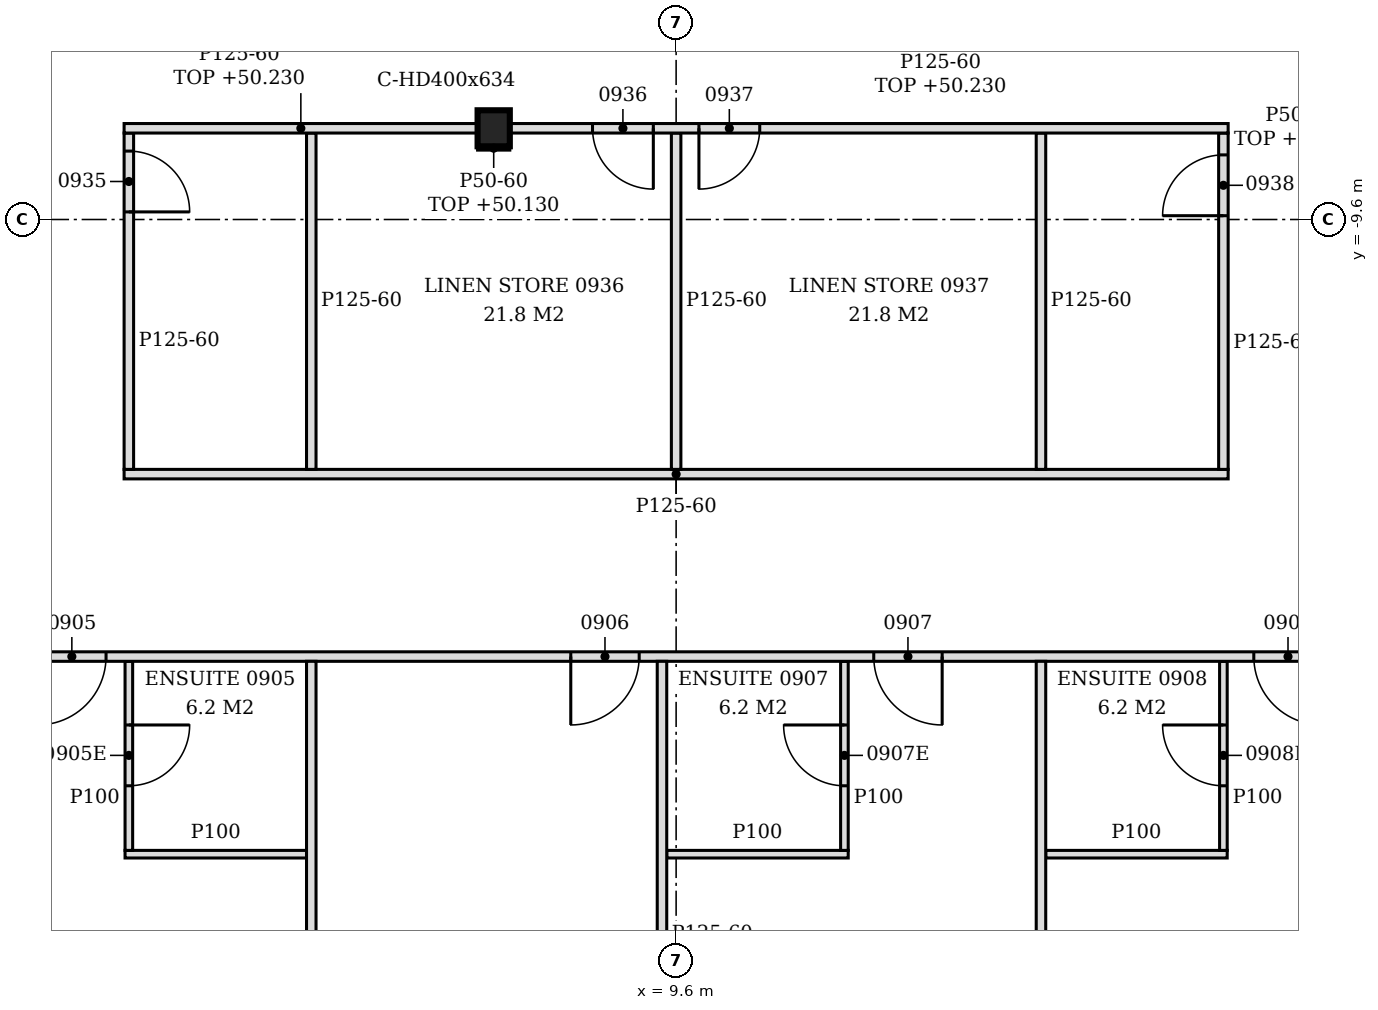
"""IFC4 building model, lengths in metres.
Left out: names, types, materials, properties, quantities, classifications, styles, units other than length and angle.
Written with IfcOpenShell. Run it as: python <this file> out.ifc"""

import sys

from ifc_helpers import new_model, si_unit, direction, frame, frame_2d, origin, origin_2d, place, context, subcontext, project, spatial, polyline, rectangle, i_section, outline, extrude, element, fill, save


model = new_model("IFC4")
c1 = context("Model", 3, precision=1e-05, world=origin(), true_north=direction((0.0, 1.0)))
c2 = subcontext(c1, "Body", "Model", "MODEL_VIEW")
j1 = project(units=[si_unit("LENGTHUNIT", "METRE"), si_unit("PLANEANGLEUNIT", "RADIAN")], contexts=[c1])
p1 = place(None, origin())
s1 = spatial("IfcSite", under=j1, at=p1, CompositionType="ELEMENT")
p2 = place(p1, origin())
s2 = spatial("IfcBuilding", under=s1, at=p2, CompositionType="ELEMENT")
p3 = place(p2, frame((0.0, 0.0, 47.4)))
s3 = spatial("IfcBuildingStorey", under=s2, at=p3, CompositionType="ELEMENT", Elevation=47.4)
p4 = place(p3, frame((7.2, -8.4, -0.15), z_axis=(0.0, 0.0, 1.0), x_axis=(1.0, 0.0, 0.0)))
e1 = element("IfcColumn", 1, at=p4, inside=s3, PredefinedType="COLUMN", context=c2, shape_type="SweptSolid", body=[
    extrude(i_section(OverallWidth=0.424, OverallDepth=0.474, WebThickness=0.048, FlangeThickness=0.077, FilletRadius=0.015, at=origin_2d()), origin(), (0.0, 0.0, 1.0), 3.6),
])
for number, where, z_axis, x_axis in (
    (2, (4.8, -23.65, 0.0), (0.0, 0.0, 1.0), (0.0, 1.0, 0.0)),
    (3, (14.4, -23.65, 0.0), (0.0, 0.0, 1.0), (0.0, 1.0, 0.0)),
):
    element("IfcWall", number, at=place(p3, frame(where, z_axis=z_axis, x_axis=x_axis)), inside=s3, PredefinedType="PARTITIONING", context=c2, shape_type="SweptSolid", body=[
        extrude(outline(polyline([(0.0, 0.0), (8.237, 0.0), (8.238, 3.45), (4.555, 3.45), (4.553, 2.88), (4.345, 2.88), (4.343, 3.45), (0.7, 3.45), (0.698, 2.93), (0.4, 2.93), (0.398, 3.45), (0.0, 3.45), (0.0, 0.0)])), frame((0.0, 0.062, 0.0), z_axis=(0.0, -1.0, 0.0), x_axis=(1.0, 0.0, 0.0)), (0.0, 0.0, 1.0), 0.125),
    ])
p5 = place(p3, frame((9.414, -22.6, 0.0), z_axis=(0.0, 0.0, 1.0), x_axis=(0.0, 1.0, 0.0)))
e4 = element("IfcWall", 4, at=p5, inside=s3, PredefinedType="PARTITIONING", context=c2, shape_type="SweptSolid", body=[
    extrude(outline(polyline([(0.0, 0.0), (7.188, 0.0), (7.188, 3.45), (3.505, 3.45), (3.503, 2.88), (3.295, 2.88), (3.293, 3.45), (0.0, 3.45), (0.0, 0.0)])), frame((0.0, 0.062, 0.0), z_axis=(0.0, -1.0, 0.0), x_axis=(1.0, 0.0, 0.0)), (0.0, 0.0, 1.0), 0.125),
])
p6 = place(p3, frame((2.35, -17.95, 0.0), z_axis=(0.0, 0.0, 1.0), x_axis=(1.0, 0.0, 0.0)))
e5 = element("IfcWall", 5, at=p6, inside=s3, PredefinedType="PARTITIONING", context=c2, shape_type="SweptSolid", body=[
    extrude(rectangle(XDim=2.387, YDim=0.1, at=frame_2d((1.194, 0.0))), origin(), (0.0, 0.0, 1.0), 3.45),
])
p7 = place(p3, frame((2.4, -17.9, 0.0), z_axis=(0.0, 0.0, 1.0), x_axis=(0.0, 1.0, 0.0)))
e6 = element("IfcWall", 6, at=p7, inside=s3, PredefinedType="PARTITIONING", context=c2, shape_type="SweptSolid", body=[
    extrude(rectangle(XDim=2.487, YDim=0.1, at=frame_2d((1.244, 0.0))), origin(), (0.0, 0.0, 1.0), 3.45),
])
p8 = place(p7, frame((0.85, 0.0, 0.0)))
e7 = element("IfcOpeningElement", 7, at=p8, cuts=e6, PredefinedType="OPENING", context=c2, shape_type="SweptSolid", body=[
    extrude(rectangle(XDim=0.8, YDim=2.1, at=frame_2d((0.4, 1.05))), frame((0.0, 0.06, 0.0), z_axis=(0.0, -1.0, 0.0), x_axis=(1.0, 0.0, 0.0)), (0.0, 0.0, 1.0), 0.12),
])
p9 = place(p3, frame((9.477, -17.95, 0.0), z_axis=(0.0, 0.0, 1.0), x_axis=(1.0, 0.0, 0.0)))
e8 = element("IfcWall", 8, at=p9, inside=s3, PredefinedType="PARTITIONING", context=c2, shape_type="SweptSolid", body=[
    extrude(rectangle(XDim=2.387, YDim=0.1, at=frame_2d((1.194, 0.0))), origin(), (0.0, 0.0, 1.0), 3.45),
])
p10 = place(p3, frame((11.814, -17.9, 0.0), z_axis=(0.0, 0.0, 1.0), x_axis=(0.0, 1.0, 0.0)))
e9 = element("IfcWall", 9, at=p10, inside=s3, PredefinedType="PARTITIONING", context=c2, shape_type="SweptSolid", body=[
    extrude(rectangle(XDim=2.487, YDim=0.1, at=frame_2d((1.244, 0.0))), origin(), (0.0, 0.0, 1.0), 3.45),
])
p11 = place(p10, frame((0.85, 0.0, 0.0)))
e10 = element("IfcOpeningElement", 10, at=p11, cuts=e9, PredefinedType="OPENING", context=c2, shape_type="SweptSolid", body=[
    extrude(rectangle(XDim=0.8, YDim=2.1, at=frame_2d((0.4, 1.05))), frame((0.0, 0.06, 0.0), z_axis=(0.0, -1.0, 0.0), x_axis=(1.0, 0.0, 0.0)), (0.0, 0.0, 1.0), 0.12),
])
p12 = place(p3, frame((14.462, -17.95, 0.0), z_axis=(0.0, 0.0, 1.0), x_axis=(1.0, 0.0, 0.0)))
e11 = element("IfcWall", 11, at=p12, inside=s3, PredefinedType="PARTITIONING", context=c2, shape_type="SweptSolid", body=[
    extrude(rectangle(XDim=2.388, YDim=0.1, at=frame_2d((1.194, 0.0))), origin(), (0.0, 0.0, 1.0), 3.45),
])
p13 = place(p3, frame((16.8, -17.9, 0.0), z_axis=(0.0, 0.0, 1.0), x_axis=(0.0, 1.0, 0.0)))
e12 = element("IfcWall", 12, at=p13, inside=s3, PredefinedType="PARTITIONING", context=c2, shape_type="SweptSolid", body=[
    extrude(rectangle(XDim=2.487, YDim=0.1, at=frame_2d((1.244, 0.0))), origin(), (0.0, 0.0, 1.0), 3.45),
])
p14 = place(p13, frame((0.85, 0.0, 0.0)))
e13 = element("IfcOpeningElement", 13, at=p14, cuts=e12, PredefinedType="OPENING", context=c2, shape_type="SweptSolid", body=[
    extrude(rectangle(XDim=0.8, YDim=2.1, at=frame_2d((0.4, 1.05))), frame((0.0, 0.06, 0.0), z_axis=(0.0, -1.0, 0.0), x_axis=(1.0, 0.0, 0.0)), (0.0, 0.0, 1.0), 0.12),
])
p15 = place(p3, frame((-20.15, -15.35, 0.0), z_axis=(0.0, 0.0, 1.0), x_axis=(1.0, 0.0, 0.0)))
e14 = element("IfcWall", 14, at=p15, inside=s3, PredefinedType="PARTITIONING", context=c2, shape_type="SweptSolid", body=[
    extrude(outline(polyline([(0.0, 0.0), (39.287, 0.0), (39.288, 2.73), (39.2, 2.73), (39.198, 3.45), (27.5, 3.45), (27.498, 2.73), (27.2, 2.73), (27.198, 3.45), (15.5, 3.45), (15.498, 2.73), (15.2, 2.73), (15.198, 3.45), (5.9, 3.45), (5.898, 2.93), (5.6, 2.93), (5.598, 3.45), (0.0, 3.45), (0.0, 0.0)])), frame((0.0, 0.062, 0.0), z_axis=(0.0, -1.0, 0.0), x_axis=(1.0, 0.0, 0.0)), (0.0, 0.0, 1.0), 0.125),
])
p16 = place(p15, frame((4.55, 0.0, 0.0)))
e15 = element("IfcOpeningElement", 15, at=p16, cuts=e14, PredefinedType="OPENING", context=c2, shape_type="SweptSolid", body=[
    extrude(rectangle(XDim=0.9, YDim=2.1, at=frame_2d((0.45, 1.05))), frame((0.0, 0.073, 0.0), z_axis=(0.0, -1.0, 0.0), x_axis=(1.0, 0.0, 0.0)), (0.0, 0.0, 1.0), 0.145),
])
p17 = place(p15, frame((7.136, 0.0, 0.0)))
e16 = element("IfcOpeningElement", 16, at=p17, cuts=e14, PredefinedType="OPENING", context=c2, shape_type="SweptSolid", body=[
    extrude(rectangle(XDim=0.9, YDim=2.1, at=frame_2d((0.45, 1.05))), frame((0.0, 0.073, 0.0), z_axis=(0.0, -1.0, 0.0), x_axis=(1.0, 0.0, 0.0)), (0.0, 0.0, 1.0), 0.145),
])
p18 = place(p15, frame((14.15, 0.0, 0.0)))
e17 = element("IfcOpeningElement", 17, at=p18, cuts=e14, PredefinedType="OPENING", context=c2, shape_type="SweptSolid", body=[
    extrude(rectangle(XDim=0.9, YDim=2.1, at=frame_2d((0.45, 1.05))), frame((0.0, 0.073, 0.0), z_axis=(0.0, -1.0, 0.0), x_axis=(1.0, 0.0, 0.0)), (0.0, 0.0, 1.0), 0.145),
])
p19 = place(p15, frame((16.55, 0.0, 0.0)))
e18 = element("IfcOpeningElement", 18, at=p19, cuts=e14, PredefinedType="OPENING", context=c2, shape_type="SweptSolid", body=[
    extrude(rectangle(XDim=0.9, YDim=2.1, at=frame_2d((0.45, 1.05))), frame((0.0, 0.073, 0.0), z_axis=(0.0, -1.0, 0.0), x_axis=(1.0, 0.0, 0.0)), (0.0, 0.0, 1.0), 0.145),
])
p20 = place(p15, frame((21.35, 0.0, 0.0)))
e19 = element("IfcOpeningElement", 19, at=p20, cuts=e14, PredefinedType="OPENING", context=c2, shape_type="SweptSolid", body=[
    extrude(rectangle(XDim=0.9, YDim=2.1, at=frame_2d((0.45, 1.05))), frame((0.0, 0.073, 0.0), z_axis=(0.0, -1.0, 0.0), x_axis=(1.0, 0.0, 0.0)), (0.0, 0.0, 1.0), 0.145),
])
p21 = place(p15, frame((28.364, 0.0, 0.0)))
e20 = element("IfcOpeningElement", 20, at=p21, cuts=e14, PredefinedType="OPENING", context=c2, shape_type="SweptSolid", body=[
    extrude(rectangle(XDim=0.9, YDim=2.1, at=frame_2d((0.45, 1.05))), frame((0.0, 0.073, 0.0), z_axis=(0.0, -1.0, 0.0), x_axis=(1.0, 0.0, 0.0)), (0.0, 0.0, 1.0), 0.145),
])
p22 = place(p15, frame((32.35, 0.0, 0.0)))
e21 = element("IfcOpeningElement", 21, at=p22, cuts=e14, PredefinedType="OPENING", context=c2, shape_type="SweptSolid", body=[
    extrude(rectangle(XDim=0.9, YDim=2.1, at=frame_2d((0.45, 1.05))), frame((0.0, 0.073, 0.0), z_axis=(0.0, -1.0, 0.0), x_axis=(1.0, 0.0, 0.0)), (0.0, 0.0, 1.0), 0.145),
])
p23 = place(p15, frame((37.35, 0.0, 0.0)))
e22 = element("IfcOpeningElement", 22, at=p23, cuts=e14, PredefinedType="OPENING", context=c2, shape_type="SweptSolid", body=[
    extrude(rectangle(XDim=0.9, YDim=2.1, at=frame_2d((0.45, 1.05))), frame((0.0, 0.073, 0.0), z_axis=(0.0, -1.0, 0.0), x_axis=(1.0, 0.0, 0.0)), (0.0, 0.0, 1.0), 0.145),
])
p24 = place(p3, frame((2.337, -12.95, 0.0), z_axis=(0.0, 0.0, 1.0), x_axis=(1.0, 0.0, 0.0)))
e23 = element("IfcWall", 23, at=p24, inside=s3, PredefinedType="PARTITIONING", context=c2, shape_type="SweptSolid", body=[
    extrude(outline(polyline([(0.0, 0.0), (14.525, 0.0), (14.525, 3.45), (5.012, 3.45), (5.01, 2.73), (4.712, 2.73), (4.71, 3.45), (0.0, 3.45), (0.0, 0.0)])), frame((0.0, 0.062, 0.0), z_axis=(0.0, -1.0, 0.0), x_axis=(1.0, 0.0, 0.0)), (0.0, 0.0, 1.0), 0.125),
])
p25 = place(p3, frame((2.4, -12.887, 0.0), z_axis=(0.0, 0.0, 1.0), x_axis=(0.0, 1.0, 0.0)))
e24 = element("IfcWall", 24, at=p25, inside=s3, PredefinedType="PARTITIONING", context=c2, shape_type="SweptSolid", body=[
    extrude(outline(polyline([(0.0, 0.0), (4.425, 0.0), (4.425, 2.83), (4.337, 2.83), (4.335, 3.45), (0.0, 3.45), (0.0, 0.0)])), frame((0.0, 0.062, 0.0), z_axis=(0.0, -1.0, 0.0), x_axis=(1.0, 0.0, 0.0)), (0.0, 0.0, 1.0), 0.125),
])
p26 = place(p25, frame((3.387, 0.0, 0.0)))
e25 = element("IfcOpeningElement", 25, at=p26, cuts=e24, PredefinedType="OPENING", context=c2, shape_type="SweptSolid", body=[
    extrude(rectangle(XDim=0.8, YDim=2.1, at=frame_2d((0.4, 1.05))), frame((0.0, 0.073, 0.0), z_axis=(0.0, -1.0, 0.0), x_axis=(1.0, 0.0, 0.0)), (0.0, 0.0, 1.0), 0.145),
])
for number, where, z_axis, x_axis in (
    (26, (4.8, -12.887, 0.0), (0.0, 0.0, 1.0), (0.0, 1.0, 0.0)),
    (27, (9.6, -12.887, 0.0), (0.0, 0.0, 1.0), (0.0, 1.0, 0.0)),
    (28, (14.4, -12.887, 0.0), (0.0, 0.0, 1.0), (0.0, 1.0, 0.0)),
):
    element("IfcWall", number, at=place(p3, frame(where, z_axis=z_axis, x_axis=x_axis)), inside=s3, PredefinedType="PARTITIONING", context=c2, shape_type="SweptSolid", body=[
        extrude(outline(polyline([(0.0, 0.0), (4.425, 0.0), (4.425, 2.83), (4.337, 2.83), (4.335, 3.45), (0.0, 3.45), (0.0, 0.0)])), frame((0.0, 0.062, 0.0), z_axis=(0.0, -1.0, 0.0), x_axis=(1.0, 0.0, 0.0)), (0.0, 0.0, 1.0), 0.125),
    ])
p27 = place(p3, frame((16.8, -12.887, 0.0), z_axis=(0.0, 0.0, 1.0), x_axis=(0.0, 1.0, 0.0)))
e29 = element("IfcWall", 29, at=p27, inside=s3, PredefinedType="PARTITIONING", context=c2, shape_type="SweptSolid", body=[
    extrude(outline(polyline([(0.0, 0.0), (4.425, 0.0), (4.425, 2.83), (4.337, 2.83), (4.335, 3.45), (0.0, 3.45), (0.0, 0.0)])), frame((0.0, 0.062, 0.0), z_axis=(0.0, -1.0, 0.0), x_axis=(1.0, 0.0, 0.0)), (0.0, 0.0, 1.0), 0.125),
])
p28 = place(p27, frame((3.337, 0.0, 0.0)))
e30 = element("IfcOpeningElement", 30, at=p28, cuts=e29, PredefinedType="OPENING", context=c2, shape_type="SweptSolid", body=[
    extrude(rectangle(XDim=0.8, YDim=2.1, at=frame_2d((0.4, 1.05))), frame((0.0, 0.073, 0.0), z_axis=(0.0, -1.0, 0.0), x_axis=(1.0, 0.0, 0.0)), (0.0, 0.0, 1.0), 0.145),
])
p29 = place(p3, frame((2.337, -8.4, 0.0), z_axis=(0.0, 0.0, 1.0), x_axis=(1.0, 0.0, 0.0)))
e31 = element("IfcWall", 31, at=p29, inside=s3, PredefinedType="PARTITIONING", context=c2, shape_type="SweptSolid", body=[
    extrude(rectangle(XDim=4.651, YDim=0.125, at=frame_2d((2.325, 0.0))), origin(), (0.0, 0.0, 1.0), 2.83),
])
p30 = place(p3, frame((7.412, -8.4, 0.0), z_axis=(0.0, 0.0, 1.0), x_axis=(1.0, 0.0, 0.0)))
e32 = element("IfcWall", 32, at=p30, inside=s3, PredefinedType="PARTITIONING", context=c2, shape_type="SweptSolid", body=[
    extrude(rectangle(XDim=9.45, YDim=0.125, at=frame_2d((4.725, 0.0))), origin(), (0.0, 0.0, 1.0), 2.83),
])
p31 = place(p30, frame((1.088, 0.0, 0.0)))
e33 = element("IfcOpeningElement", 33, at=p31, cuts=e32, PredefinedType="OPENING", context=c2, shape_type="SweptSolid", body=[
    extrude(rectangle(XDim=0.8, YDim=2.1, at=frame_2d((0.4, 1.05))), frame((0.0, 0.073, 0.0), z_axis=(0.0, -1.0, 0.0), x_axis=(1.0, 0.0, 0.0)), (0.0, 0.0, 1.0), 0.145),
])
p32 = place(p30, frame((2.488, 0.0, 0.0)))
e34 = element("IfcOpeningElement", 34, at=p32, cuts=e32, PredefinedType="OPENING", context=c2, shape_type="SweptSolid", body=[
    extrude(rectangle(XDim=0.8, YDim=2.1, at=frame_2d((0.4, 1.05))), frame((0.0, 0.073, 0.0), z_axis=(0.0, -1.0, 0.0), x_axis=(1.0, 0.0, 0.0)), (0.0, 0.0, 1.0), 0.145),
])
p33 = place(p3, frame((6.988, -8.662, 0.0), z_axis=(0.0, 0.0, 1.0), x_axis=(1.0, 0.0, 0.0)))
e35 = element("IfcWall", 35, at=p33, inside=s3, PredefinedType="PARTITIONING", context=c2, shape_type="SweptSolid", body=[
    extrude(rectangle(XDim=0.424, YDim=0.05, at=frame_2d((0.212, 0.0))), origin(), (0.0, 0.0, 1.0), 2.73),
])
p34 = place(p20, frame((0.9, 0.0, 0.0), z_axis=(0.0, 0.0, 1.0), x_axis=(-1.0, 0.0, 0.0)))
e36 = element("IfcDoor", 36, at=p34, inside=s3, OperationType="SINGLE_SWING_RIGHT", PredefinedType="DOOR", context=c2, shape_type="SweptSolid", body=[
    extrude(rectangle(XDim=0.9, YDim=2.1, at=frame_2d((0.45, 1.05))), frame((0.0, 0.025, 0.0), z_axis=(0.0, -1.0, 0.0), x_axis=(1.0, 0.0, 0.0)), (0.0, 0.0, 1.0), 0.05),
])
fill(e19, e36)
p35 = place(p8, frame((0.8, 0.0, 0.0), z_axis=(0.0, 0.0, 1.0), x_axis=(-1.0, 0.0, 0.0)))
e37 = element("IfcDoor", 37, at=p35, inside=s3, OperationType="SINGLE_SWING_LEFT", PredefinedType="DOOR", context=c2, shape_type="SweptSolid", body=[
    extrude(rectangle(XDim=0.8, YDim=2.1, at=frame_2d((0.4, 1.05))), frame((0.0, 0.025, 0.0), z_axis=(0.0, -1.0, 0.0), x_axis=(1.0, 0.0, 0.0)), (0.0, 0.0, 1.0), 0.05),
])
fill(e7, e37)
p36 = place(p21, frame((0.9, 0.0, 0.0), z_axis=(0.0, 0.0, 1.0), x_axis=(-1.0, 0.0, 0.0)))
e38 = element("IfcDoor", 38, at=p36, inside=s3, OperationType="SINGLE_SWING_RIGHT", PredefinedType="DOOR", context=c2, shape_type="SweptSolid", body=[
    extrude(rectangle(XDim=0.9, YDim=2.1, at=frame_2d((0.45, 1.05))), frame((0.0, 0.025, 0.0), z_axis=(0.0, -1.0, 0.0), x_axis=(1.0, 0.0, 0.0)), (0.0, 0.0, 1.0), 0.05),
])
fill(e20, e38)
p37 = place(p22, frame((0.9, 0.0, 0.0), z_axis=(0.0, 0.0, 1.0), x_axis=(-1.0, 0.0, 0.0)))
e39 = element("IfcDoor", 39, at=p37, inside=s3, OperationType="SINGLE_SWING_LEFT", PredefinedType="DOOR", context=c2, shape_type="SweptSolid", body=[
    extrude(rectangle(XDim=0.9, YDim=2.1, at=frame_2d((0.45, 1.05))), frame((0.0, 0.025, 0.0), z_axis=(0.0, -1.0, 0.0), x_axis=(1.0, 0.0, 0.0)), (0.0, 0.0, 1.0), 0.05),
])
fill(e21, e39)
p38 = place(p11, origin())
e40 = element("IfcDoor", 40, at=p38, inside=s3, OperationType="SINGLE_SWING_RIGHT", PredefinedType="DOOR", context=c2, shape_type="SweptSolid", body=[
    extrude(rectangle(XDim=0.8, YDim=2.1, at=frame_2d((0.4, 1.05))), frame((0.0, 0.025, 0.0), z_axis=(0.0, -1.0, 0.0), x_axis=(1.0, 0.0, 0.0)), (0.0, 0.0, 1.0), 0.05),
])
fill(e10, e40)
p39 = place(p23, frame((0.9, 0.0, 0.0), z_axis=(0.0, 0.0, 1.0), x_axis=(-1.0, 0.0, 0.0)))
e41 = element("IfcDoor", 41, at=p39, inside=s3, OperationType="SINGLE_SWING_LEFT", PredefinedType="DOOR", context=c2, shape_type="SweptSolid", body=[
    extrude(rectangle(XDim=0.9, YDim=2.1, at=frame_2d((0.45, 1.05))), frame((0.0, 0.025, 0.0), z_axis=(0.0, -1.0, 0.0), x_axis=(1.0, 0.0, 0.0)), (0.0, 0.0, 1.0), 0.05),
])
fill(e22, e41)
p40 = place(p14, origin())
e42 = element("IfcDoor", 42, at=p40, inside=s3, OperationType="SINGLE_SWING_RIGHT", PredefinedType="DOOR", context=c2, shape_type="SweptSolid", body=[
    extrude(rectangle(XDim=0.8, YDim=2.1, at=frame_2d((0.4, 1.05))), frame((0.0, 0.025, 0.0), z_axis=(0.0, -1.0, 0.0), x_axis=(1.0, 0.0, 0.0)), (0.0, 0.0, 1.0), 0.05),
])
fill(e13, e42)
p41 = place(p26, frame((0.8, 0.0, 0.0), z_axis=(0.0, 0.0, 1.0), x_axis=(-1.0, 0.0, 0.0)))
e43 = element("IfcDoor", 43, at=p41, inside=s3, OperationType="SINGLE_SWING_RIGHT", PredefinedType="DOOR", context=c2, shape_type="SweptSolid", body=[
    extrude(rectangle(XDim=0.8, YDim=2.1, at=frame_2d((0.4, 1.05))), frame((0.0, 0.025, 0.0), z_axis=(0.0, -1.0, 0.0), x_axis=(1.0, 0.0, 0.0)), (0.0, 0.0, 1.0), 0.05),
])
fill(e25, e43)
p42 = place(p31, frame((0.8, 0.0, 0.0), z_axis=(0.0, 0.0, 1.0), x_axis=(-1.0, 0.0, 0.0)))
e44 = element("IfcDoor", 44, at=p42, inside=s3, OperationType="SINGLE_SWING_LEFT", PredefinedType="DOOR", context=c2, shape_type="SweptSolid", body=[
    extrude(rectangle(XDim=0.8, YDim=2.1, at=frame_2d((0.4, 1.05))), frame((0.0, 0.025, 0.0), z_axis=(0.0, -1.0, 0.0), x_axis=(1.0, 0.0, 0.0)), (0.0, 0.0, 1.0), 0.05),
])
fill(e33, e44)
p43 = place(p32, frame((0.8, 0.0, 0.0), z_axis=(0.0, 0.0, 1.0), x_axis=(-1.0, 0.0, 0.0)))
e45 = element("IfcDoor", 45, at=p43, inside=s3, OperationType="SINGLE_SWING_RIGHT", PredefinedType="DOOR", context=c2, shape_type="SweptSolid", body=[
    extrude(rectangle(XDim=0.8, YDim=2.1, at=frame_2d((0.4, 1.05))), frame((0.0, 0.025, 0.0), z_axis=(0.0, -1.0, 0.0), x_axis=(1.0, 0.0, 0.0)), (0.0, 0.0, 1.0), 0.05),
])
fill(e34, e45)
p44 = place(p28, origin())
e46 = element("IfcDoor", 46, at=p44, inside=s3, OperationType="SINGLE_SWING_LEFT", PredefinedType="DOOR", context=c2, shape_type="SweptSolid", body=[
    extrude(rectangle(XDim=0.8, YDim=2.1, at=frame_2d((0.4, 1.05))), frame((0.0, 0.025, 0.0), z_axis=(0.0, -1.0, 0.0), x_axis=(1.0, 0.0, 0.0)), (0.0, 0.0, 1.0), 0.05),
])
fill(e30, e46)
save(model, sys.argv[1])
